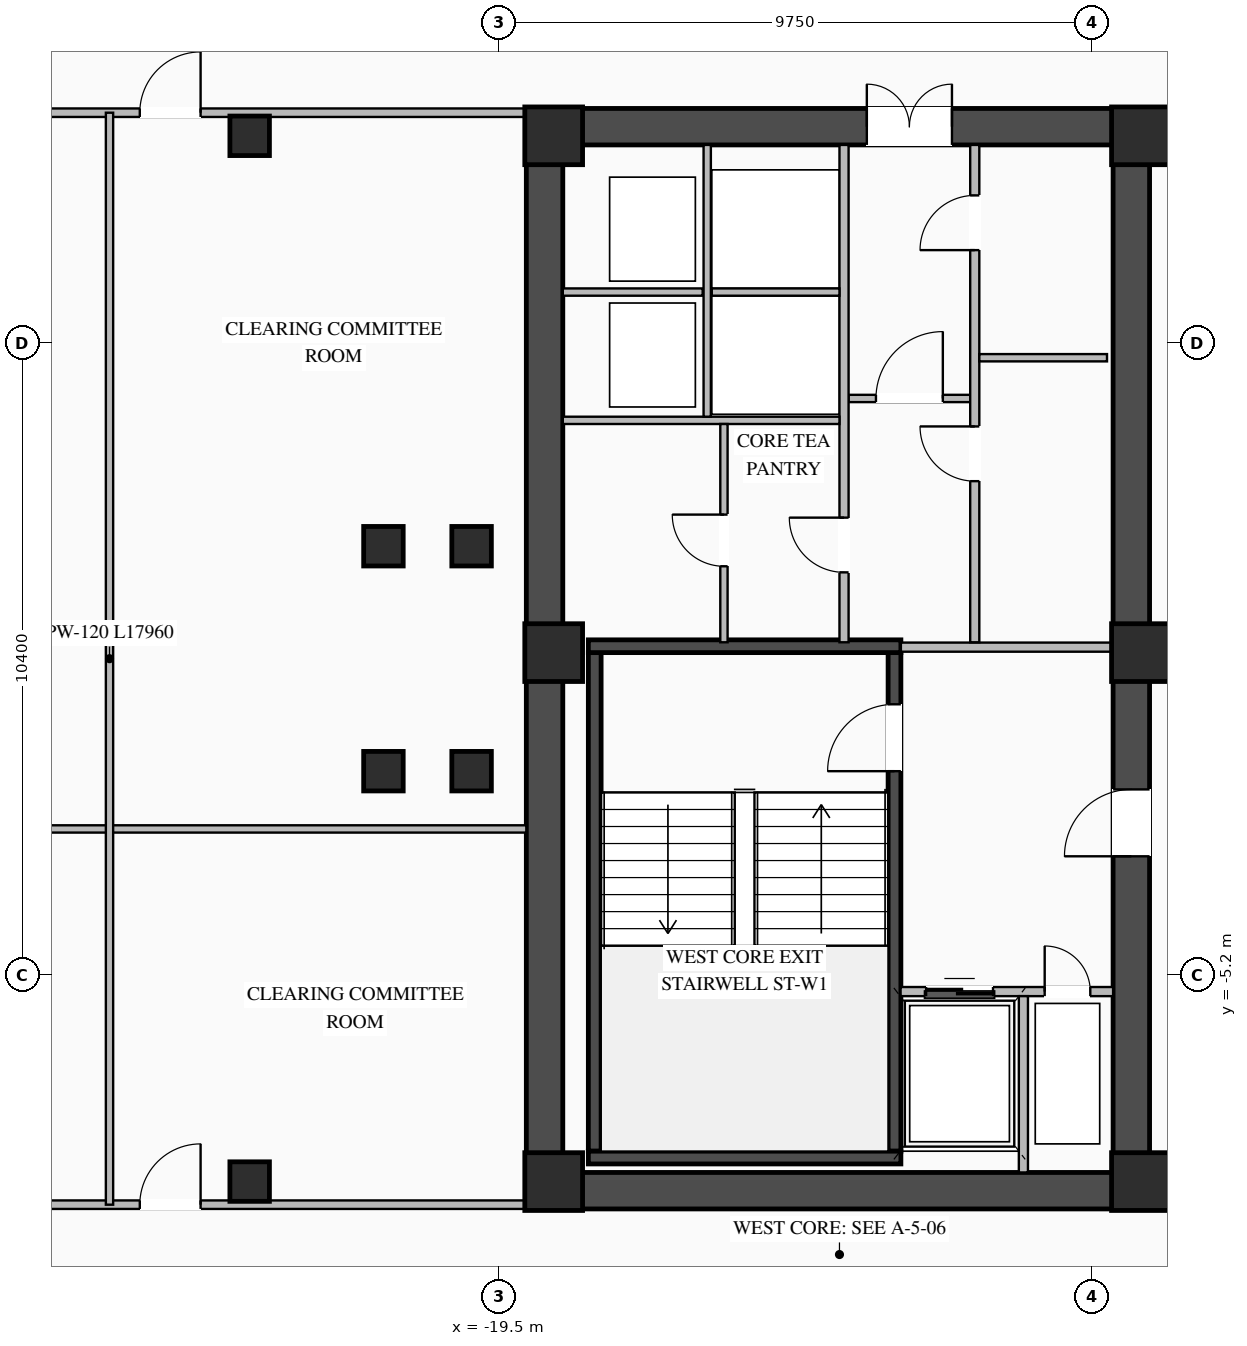
"""IFC4 building model, lengths in metres.
Left out: names, types, materials, properties, quantities, classifications, styles, units other than length and angle.
Written with IfcOpenShell. Run it as: python <this file> out.ifc"""

import sys

from ifc_helpers import new_model, si_unit, direction, frame, frame_2d, origin, origin_2d, place, context, subcontext, project, spatial, rectangle, i_section, extrude, element, fill, save


model = new_model("IFC4")
c1 = context("Model", 3, precision=1e-05, world=origin(), true_north=direction((0.0, 1.0)))
c2 = subcontext(c1, "Body", "Model", "MODEL_VIEW")
j1 = project(units=[si_unit("LENGTHUNIT", "METRE"), si_unit("PLANEANGLEUNIT", "RADIAN")], contexts=[c1])
p1 = place(None, origin())
s1 = spatial("IfcSite", under=j1, at=p1, CompositionType="ELEMENT")
p2 = place(p1, origin())
s2 = spatial("IfcBuilding", under=s1, at=p2, CompositionType="ELEMENT")
p3 = place(p2, frame((0.0, 0.0, 131.2)))
s3 = spatial("IfcBuildingStorey", under=s2, at=p3, CompositionType="ELEMENT", Elevation=131.2)
p4 = place(p3, frame((-19.05, -8.75, 0.0), z_axis=(0.0, 0.0, 1.0), x_axis=(1.0, 0.0, 0.0)))
e1 = element("IfcWall", 1, at=p4, inside=s3, PredefinedType="SHEAR", context=c2, shape_type="SweptSolid", body=[
    extrude(rectangle(XDim=10.25, YDim=0.6, at=frame_2d((5.125, 0.0))), origin(), (0.0, 0.0, 1.0), 3.27),
])
p5 = place(p3, frame((-19.05, 8.75, 0.0), z_axis=(0.0, 0.0, 1.0), x_axis=(1.0, 0.0, 0.0)))
e2 = element("IfcWall", 2, at=p5, inside=s3, PredefinedType="SHEAR", context=c2, shape_type="SweptSolid", body=[
    extrude(rectangle(XDim=10.25, YDim=0.6, at=frame_2d((5.125, 0.0))), origin(), (0.0, 0.0, 1.0), 3.27),
])
p6 = place(p5, frame((5.6, 0.0, 0.0)))
e3 = element("IfcOpeningElement", 3, at=p6, cuts=e2, PredefinedType="OPENING", context=c2, shape_type="SweptSolid", body=[
    extrude(rectangle(XDim=1.4, YDim=2.05, at=frame_2d((0.7, 1.025))), frame((0.0, 0.31, 0.0), z_axis=(0.0, -1.0, 0.0), x_axis=(1.0, 0.0, 0.0)), (0.0, 0.0, 1.0), 0.62),
])
p7 = place(p3, frame((-18.75, -8.45, 0.0), z_axis=(0.0, 0.0, 1.0), x_axis=(0.0, 1.0, 0.0)))
e4 = element("IfcWall", 4, at=p7, inside=s3, PredefinedType="SHEAR", context=c2, shape_type="SweptSolid", body=[
    extrude(rectangle(XDim=16.9, YDim=0.6, at=frame_2d((8.45, 0.0))), origin(), (0.0, 0.0, 1.0), 3.27),
])
p8 = place(p3, frame((-9.1, -8.45, 0.0), z_axis=(0.0, 0.0, 1.0), x_axis=(0.0, 1.0, 0.0)))
e5 = element("IfcWall", 5, at=p8, inside=s3, PredefinedType="SHEAR", context=c2, shape_type="SweptSolid", body=[
    extrude(rectangle(XDim=16.9, YDim=0.6, at=frame_2d((8.45, 0.0))), origin(), (0.0, 0.0, 1.0), 3.27),
])
p9 = place(p8, frame((5.2, 0.0, 0.0)))
e6 = element("IfcOpeningElement", 6, at=p9, cuts=e5, PredefinedType="OPENING", context=c2, shape_type="SweptSolid", body=[
    extrude(rectangle(XDim=1.1, YDim=2.08, at=frame_2d((0.55, 1.04))), frame((0.0, 0.31, 0.0), z_axis=(0.0, -1.0, 0.0), x_axis=(1.0, 0.0, 0.0)), (0.0, 0.0, 1.0), 0.62),
])
p10 = place(p3, frame((-12.995, -8.1, 0.0), z_axis=(0.0, 0.0, 1.0), x_axis=(0.0, 1.0, 0.0)))
e7 = element("IfcWall", 7, at=p10, inside=s3, PredefinedType="SHEAR", context=c2, shape_type="SweptSolid", body=[
    extrude(rectangle(XDim=8.2, YDim=0.21, at=frame_2d((4.1, 0.0))), origin(), (0.0, 0.0, 1.0), 3.27),
])
p11 = place(p10, frame((6.25, 0.0, 0.0)))
e8 = element("IfcOpeningElement", 8, at=p11, cuts=e7, PredefinedType="OPENING", context=c2, shape_type="SweptSolid", body=[
    extrude(rectangle(XDim=1.1, YDim=2.15, at=frame_2d((0.55, 1.075))), frame((0.0, 0.115, 0.0), z_axis=(0.0, -1.0, 0.0), x_axis=(1.0, 0.0, 0.0)), (0.0, 0.0, 1.0), 0.23),
])
p12 = place(p3, frame((-17.925, -8.1, 0.0), z_axis=(0.0, 0.0, 1.0), x_axis=(0.0, 1.0, 0.0)))
e9 = element("IfcWall", 9, at=p12, inside=s3, PredefinedType="SHEAR", context=c2, shape_type="SweptSolid", body=[
    extrude(rectangle(XDim=8.2, YDim=0.21, at=frame_2d((4.1, 0.0))), origin(), (0.0, 0.0, 1.0), 3.27),
])
for number, where, z_axis, x_axis in (
    (10, (-18.03, -8.205, 0.0), (0.0, 0.0, 1.0), (1.0, 0.0, 0.0)),
    (11, (-12.89, 0.205, 0.0), (0.0, 0.0, 1.0), (-1.0, 0.0, 0.0)),
):
    element("IfcWall", number, at=place(p3, frame(where, z_axis=z_axis, x_axis=x_axis)), inside=s3, PredefinedType="SHEAR", context=c2, shape_type="SweptSolid", body=[
        extrude(rectangle(XDim=5.14, YDim=0.21, at=frame_2d((2.57, 0.0))), origin(), (0.0, 0.0, 1.0), 3.27),
    ])
for number, where, z_axis, x_axis in (
    (12, (-8.95, -8.6, 0.0), (0.0, 0.0, 1.0), (1.0, 0.0, 0.0)),
    (13, (-8.95, 0.1, 0.0), (0.0, 0.0, 1.0), (1.0, 0.0, 0.0)),
    (14, (-8.95, 8.6, 0.0), (0.0, 0.0, 1.0), (1.0, 0.0, 0.0)),
    (15, (-18.6, -8.6, 0.0), (0.0, 0.0, 1.0), (1.0, 0.0, 0.0)),
    (16, (-18.6, 0.1, 0.0), (0.0, 0.0, 1.0), (1.0, 0.0, 0.0)),
    (17, (-18.6, 8.6, 0.0), (0.0, 0.0, 1.0), (1.0, 0.0, 0.0)),
):
    element("IfcColumn", number, at=place(p3, frame(where, z_axis=z_axis, x_axis=x_axis)), inside=s3, PredefinedType="COLUMN", context=c2, shape_type="SweptSolid", body=[
        extrude(rectangle(XDim=0.95, YDim=0.95, at=origin_2d()), origin(), (0.0, 0.0, 1.0), 3.45),
    ])
for number, where, z_axis, x_axis in (
    (18, (-21.4, -1.85, 0.0), (0.0, 0.0, 1.0), (1.0, 0.0, 0.0)),
    (19, (-21.4, 1.85, 0.0), (0.0, 0.0, 1.0), (1.0, 0.0, 0.0)),
    (20, (-19.95, -1.85, 0.0), (0.0, 0.0, 1.0), (1.0, 0.0, 0.0)),
    (21, (-19.95, 1.85, 0.0), (0.0, 0.0, 1.0), (1.0, 0.0, 0.0)),
    (22, (-23.6, -8.6, 0.0), (0.0, 0.0, 1.0), (1.0, 0.0, 0.0)),
    (23, (-23.6, 8.6, 0.0), (0.0, 0.0, 1.0), (1.0, 0.0, 0.0)),
):
    element("IfcColumn", number, at=place(p3, frame(where, z_axis=z_axis, x_axis=x_axis)), inside=s3, PredefinedType="COLUMN", context=c2, shape_type="SweptSolid", body=[
        extrude(i_section(OverallWidth=0.65, OverallDepth=0.65, WebThickness=0.028, FlangeThickness=0.04, at=origin_2d()), origin(), (0.0, 0.0, 1.0), 3.45),
    ])
p13 = place(p3, frame((-12.895, -5.475, 0.0), z_axis=(0.0, 0.0, 1.0), x_axis=(1.0, 0.0, 0.0)))
e24 = element("IfcWall", 24, at=p13, inside=s3, PredefinedType="STANDARD", context=c2, shape_type="SweptSolid", body=[
    extrude(rectangle(XDim=3.495, YDim=0.15, at=frame_2d((1.748, 0.0))), origin(), (0.0, 0.0, 1.0), 3.25),
])
p14 = place(p13, frame((0.42, 0.0, 0.0)))
e25 = element("IfcOpeningElement", 25, at=p14, cuts=e24, PredefinedType="OPENING", context=c2, shape_type="SweptSolid", body=[
    extrude(rectangle(XDim=1.1, YDim=2.15, at=frame_2d((0.55, 1.075))), frame((0.0, 0.085, 0.0), z_axis=(0.0, -1.0, 0.0), x_axis=(1.0, 0.0, 0.0)), (0.0, 0.0, 1.0), 0.17),
])
p15 = place(p13, frame((2.37, 0.0, 0.0)))
e26 = element("IfcOpeningElement", 26, at=p15, cuts=e24, PredefinedType="OPENING", context=c2, shape_type="SweptSolid", body=[
    extrude(rectangle(XDim=0.75, YDim=2.05, at=frame_2d((0.375, 1.025))), frame((0.0, 0.085, 0.0), z_axis=(0.0, -1.0, 0.0), x_axis=(1.0, 0.0, 0.0)), (0.0, 0.0, 1.0), 0.17),
])
p16 = place(p3, frame((-10.875, -8.45, 0.0), z_axis=(0.0, 0.0, 1.0), x_axis=(0.0, 1.0, 0.0)))
e27 = element("IfcWall", 27, at=p16, inside=s3, PredefinedType="STANDARD", context=c2, shape_type="SweptSolid", body=[
    extrude(rectangle(XDim=2.9, YDim=0.15, at=frame_2d((1.45, 0.0))), origin(), (0.0, 0.0, 1.0), 3.25),
])
p17 = place(p3, frame((-12.89, 0.19, 0.0), z_axis=(0.0, 0.0, 1.0), x_axis=(1.0, 0.0, 0.0)))
e28 = element("IfcWall", 28, at=p17, inside=s3, PredefinedType="STANDARD", context=c2, shape_type="SweptSolid", body=[
    extrude(rectangle(XDim=3.49, YDim=0.15, at=frame_2d((1.745, 0.0))), origin(), (0.0, 0.0, 1.0), 2.645),
])
p18 = place(p3, frame((-13.75, 4.28, 0.0), z_axis=(0.0, 0.0, 1.0), x_axis=(1.0, 0.0, 0.0)))
e29 = element("IfcWall", 29, at=p18, inside=s3, PredefinedType="STANDARD", context=c2, shape_type="SweptSolid", body=[
    extrude(rectangle(XDim=2.0, YDim=0.12, at=frame_2d((1.0, 0.0))), origin(), (0.0, 0.0, 1.0), 3.25),
])
p19 = place(p18, frame((0.45, 0.0, 0.0)))
e30 = element("IfcOpeningElement", 30, at=p19, cuts=e29, PredefinedType="OPENING", context=c2, shape_type="SweptSolid", body=[
    extrude(rectangle(XDim=1.1, YDim=2.1, at=frame_2d((0.55, 1.05))), frame((0.0, 0.07, 0.0), z_axis=(0.0, -1.0, 0.0), x_axis=(1.0, 0.0, 0.0)), (0.0, 0.0, 1.0), 0.14),
])
p20 = place(p3, frame((-11.675, 0.27, 0.0), z_axis=(0.0, 0.0, 1.0), x_axis=(0.0, 1.0, 0.0)))
e31 = element("IfcWall", 31, at=p20, inside=s3, PredefinedType="STANDARD", context=c2, shape_type="SweptSolid", body=[
    extrude(rectangle(XDim=8.18, YDim=0.15, at=frame_2d((4.09, 0.0))), origin(), (0.0, 0.0, 1.0), 3.25),
])
p21 = place(p20, frame((2.65, 0.0, 0.0)))
e32 = element("IfcOpeningElement", 32, at=p21, cuts=e31, PredefinedType="OPENING", context=c2, shape_type="SweptSolid", body=[
    extrude(rectangle(XDim=0.9, YDim=2.05, at=frame_2d((0.45, 1.025))), frame((0.0, 0.085, 0.0), z_axis=(0.0, -1.0, 0.0), x_axis=(1.0, 0.0, 0.0)), (0.0, 0.0, 1.0), 0.17),
])
p22 = place(p20, frame((6.45, 0.0, 0.0)))
e33 = element("IfcOpeningElement", 33, at=p22, cuts=e31, PredefinedType="OPENING", context=c2, shape_type="SweptSolid", body=[
    extrude(rectangle(XDim=0.9, YDim=2.05, at=frame_2d((0.45, 1.025))), frame((0.0, 0.085, 0.0), z_axis=(0.0, -1.0, 0.0), x_axis=(1.0, 0.0, 0.0)), (0.0, 0.0, 1.0), 0.17),
])
p23 = place(p3, frame((-11.6, 4.95, 0.0), z_axis=(0.0, 0.0, 1.0), x_axis=(1.0, 0.0, 0.0)))
e34 = element("IfcWall", 34, at=p23, inside=s3, PredefinedType="STANDARD", context=c2, shape_type="SweptSolid", body=[
    extrude(rectangle(XDim=2.1, YDim=0.12, at=frame_2d((1.05, 0.0))), origin(), (0.0, 0.0, 1.0), 3.25),
])
p24 = place(p3, frame((-13.825, 0.27, 0.0), z_axis=(0.0, 0.0, 1.0), x_axis=(0.0, 1.0, 0.0)))
e35 = element("IfcWall", 35, at=p24, inside=s3, PredefinedType="STANDARD", context=c2, shape_type="SweptSolid", body=[
    extrude(rectangle(XDim=8.18, YDim=0.15, at=frame_2d((4.09, 0.0))), origin(), (0.0, 0.0, 1.0), 3.25),
])
p25 = place(p24, frame((1.15, 0.0, 0.0)))
e36 = element("IfcOpeningElement", 36, at=p25, cuts=e35, PredefinedType="OPENING", context=c2, shape_type="SweptSolid", body=[
    extrude(rectangle(XDim=0.9, YDim=2.05, at=frame_2d((0.45, 1.025))), frame((0.0, 0.085, 0.0), z_axis=(0.0, -1.0, 0.0), x_axis=(1.0, 0.0, 0.0)), (0.0, 0.0, 1.0), 0.17),
])
p26 = place(p3, frame((-18.45, 3.92, 0.0), z_axis=(0.0, 0.0, 1.0), x_axis=(1.0, 0.0, 0.0)))
e37 = element("IfcWall", 37, at=p26, inside=s3, PredefinedType="STANDARD", context=c2, shape_type="SweptSolid", body=[
    extrude(rectangle(XDim=4.55, YDim=0.12, at=frame_2d((2.275, 0.0))), origin(), (0.0, 0.0, 1.0), 3.25),
])
p27 = place(p3, frame((-18.45, 6.03, 0.0), z_axis=(0.0, 0.0, 1.0), x_axis=(1.0, 0.0, 0.0)))
e38 = element("IfcWall", 38, at=p27, inside=s3, PredefinedType="STANDARD", context=c2, shape_type="SweptSolid", body=[
    extrude(rectangle(XDim=2.3, YDim=0.12, at=frame_2d((1.15, 0.0))), origin(), (0.0, 0.0, 1.0), 3.25),
])
p28 = place(p3, frame((-16.075, 3.98, 0.0), z_axis=(0.0, 0.0, 1.0), x_axis=(0.0, 1.0, 0.0)))
e39 = element("IfcWall", 39, at=p28, inside=s3, PredefinedType="STANDARD", context=c2, shape_type="SweptSolid", body=[
    extrude(rectangle(XDim=4.47, YDim=0.12, at=frame_2d((2.235, 0.0))), origin(), (0.0, 0.0, 1.0), 3.25),
])
p29 = place(p3, frame((-16.0, 6.03, 0.0), z_axis=(0.0, 0.0, 1.0), x_axis=(1.0, 0.0, 0.0)))
e40 = element("IfcWall", 40, at=p29, inside=s3, PredefinedType="STANDARD", context=c2, shape_type="SweptSolid", body=[
    extrude(rectangle(XDim=2.1, YDim=0.12, at=frame_2d((1.05, 0.0))), origin(), (0.0, 0.0, 1.0), 3.25),
])
p30 = place(p3, frame((-15.8, 0.27, 0.0), z_axis=(0.0, 0.0, 1.0), x_axis=(0.0, 1.0, 0.0)))
e41 = element("IfcWall", 41, at=p30, inside=s3, PredefinedType="STANDARD", context=c2, shape_type="SweptSolid", body=[
    extrude(rectangle(XDim=3.59, YDim=0.12, at=frame_2d((1.795, 0.0))), origin(), (0.0, 0.0, 1.0), 3.25),
])
p31 = place(p30, frame((1.25, 0.0, 0.0)))
e42 = element("IfcOpeningElement", 42, at=p31, cuts=e41, PredefinedType="OPENING", context=c2, shape_type="SweptSolid", body=[
    extrude(rectangle(XDim=0.85, YDim=2.05, at=frame_2d((0.425, 1.025))), frame((0.0, 0.07, 0.0), z_axis=(0.0, -1.0, 0.0), x_axis=(1.0, 0.0, 0.0)), (0.0, 0.0, 1.0), 0.14),
])
p32 = place(p3, frame((-32.82, 8.98, 0.0), z_axis=(0.0, 0.0, 1.0), x_axis=(1.0, 0.0, 0.0)))
e43 = element("IfcWall", 43, at=p32, inside=s3, PredefinedType="STANDARD", context=c2, shape_type="SweptSolid", body=[
    extrude(rectangle(XDim=13.77, YDim=0.14, at=frame_2d((6.885, 0.0))), origin(), (0.0, 0.0, 1.0), 3.25),
])
p33 = place(p32, frame((1.171, 0.0, 0.0)))
e44 = element("IfcOpeningElement", 44, at=p33, cuts=e43, PredefinedType="OPENING", context=c2, shape_type="SweptSolid", body=[
    extrude(rectangle(XDim=1.0, YDim=2.08, at=frame_2d((0.5, 1.04))), frame((0.0, 0.08, 0.0), z_axis=(0.0, -1.0, 0.0), x_axis=(1.0, 0.0, 0.0)), (0.0, 0.0, 1.0), 0.16),
])
p34 = place(p32, frame((7.413, 0.0, 0.0)))
e45 = element("IfcOpeningElement", 45, at=p34, cuts=e43, PredefinedType="OPENING", context=c2, shape_type="SweptSolid", body=[
    extrude(rectangle(XDim=1.0, YDim=2.08, at=frame_2d((0.5, 1.04))), frame((0.0, 0.08, 0.0), z_axis=(0.0, -1.0, 0.0), x_axis=(1.0, 0.0, 0.0)), (0.0, 0.0, 1.0), 0.16),
])
p35 = place(p3, frame((-32.82, -8.98, 0.0), z_axis=(0.0, 0.0, 1.0), x_axis=(1.0, 0.0, 0.0)))
e46 = element("IfcWall", 46, at=p35, inside=s3, PredefinedType="STANDARD", context=c2, shape_type="SweptSolid", body=[
    extrude(rectangle(XDim=13.77, YDim=0.14, at=frame_2d((6.885, 0.0))), origin(), (0.0, 0.0, 1.0), 3.25),
])
p36 = place(p35, frame((1.171, 0.0, 0.0)))
e47 = element("IfcOpeningElement", 47, at=p36, cuts=e46, PredefinedType="OPENING", context=c2, shape_type="SweptSolid", body=[
    extrude(rectangle(XDim=1.0, YDim=2.08, at=frame_2d((0.5, 1.04))), frame((0.0, 0.08, 0.0), z_axis=(0.0, -1.0, 0.0), x_axis=(1.0, 0.0, 0.0)), (0.0, 0.0, 1.0), 0.16),
])
p37 = place(p35, frame((7.413, 0.0, 0.0)))
e48 = element("IfcOpeningElement", 48, at=p37, cuts=e46, PredefinedType="OPENING", context=c2, shape_type="SweptSolid", body=[
    extrude(rectangle(XDim=1.0, YDim=2.08, at=frame_2d((0.5, 1.04))), frame((0.0, 0.08, 0.0), z_axis=(0.0, -1.0, 0.0), x_axis=(1.0, 0.0, 0.0)), (0.0, 0.0, 1.0), 0.16),
])
p38 = place(p3, frame((-32.82, -2.8, 0.0), z_axis=(0.0, 0.0, 1.0), x_axis=(1.0, 0.0, 0.0)))
e49 = element("IfcWall", 49, at=p38, inside=s3, PredefinedType="STANDARD", context=c2, shape_type="SweptSolid", body=[
    extrude(rectangle(XDim=13.77, YDim=0.12, at=frame_2d((6.885, 0.0))), origin(), (0.0, 0.0, 1.0), 3.25),
])
p39 = place(p3, frame((-25.905, -8.98, 0.0), z_axis=(0.0, 0.0, 1.0), x_axis=(0.0, 1.0, 0.0)))
e50 = element("IfcWall", 50, at=p39, inside=s3, PredefinedType="STANDARD", context=c2, shape_type="SweptSolid", body=[
    extrude(rectangle(XDim=17.96, YDim=0.12, at=frame_2d((8.98, 0.0))), origin(), (0.0, 0.0, 1.0), 3.25),
])
p40 = place(p11, origin())
e51 = element("IfcDoor", 51, at=p40, inside=s3, OperationType="SINGLE_SWING_LEFT", PredefinedType="DOOR", context=c2, shape_type="SweptSolid", body=[
    extrude(rectangle(XDim=1.1, YDim=2.15, at=frame_2d((0.55, 1.075))), frame((0.0, 0.025, 0.0), z_axis=(0.0, -1.0, 0.0), x_axis=(1.0, 0.0, 0.0)), (0.0, 0.0, 1.0), 0.05),
])
fill(e8, e51)
p41 = place(p14, origin())
e52 = element("IfcDoor", 52, at=p41, inside=s3, OperationType="DOUBLE_DOOR_SLIDING", PredefinedType="DOOR", context=c2, shape_type="SweptSolid", body=[
    extrude(rectangle(XDim=1.1, YDim=2.15, at=frame_2d((0.55, 1.075))), frame((0.0, 0.025, 0.0), z_axis=(0.0, -1.0, 0.0), x_axis=(1.0, 0.0, 0.0)), (0.0, 0.0, 1.0), 0.05),
])
fill(e25, e52)
p42 = place(p15, origin())
e53 = element("IfcDoor", 53, at=p42, inside=s3, OperationType="SINGLE_SWING_LEFT", PredefinedType="DOOR", context=c2, shape_type="SweptSolid", body=[
    extrude(rectangle(XDim=0.75, YDim=2.05, at=frame_2d((0.375, 1.025))), frame((0.0, 0.025, 0.0), z_axis=(0.0, -1.0, 0.0), x_axis=(1.0, 0.0, 0.0)), (0.0, 0.0, 1.0), 0.05),
])
fill(e26, e53)
p43 = place(p9, origin())
e54 = element("IfcDoor", 54, at=p43, inside=s3, OperationType="SINGLE_SWING_LEFT", PredefinedType="DOOR", context=c2, shape_type="SweptSolid", body=[
    extrude(rectangle(XDim=1.1, YDim=2.08, at=frame_2d((0.55, 1.04))), frame((0.0, 0.255, 0.0), z_axis=(0.0, -1.0, 0.0), x_axis=(1.0, 0.0, 0.0)), (0.0, 0.0, 1.0), 0.05),
])
fill(e6, e54)
p44 = place(p19, origin())
e55 = element("IfcDoor", 55, at=p44, inside=s3, OperationType="SINGLE_SWING_RIGHT", PredefinedType="DOOR", context=c2, shape_type="SweptSolid", body=[
    extrude(rectangle(XDim=1.1, YDim=2.1, at=frame_2d((0.55, 1.05))), frame((0.0, 0.025, 0.0), z_axis=(0.0, -1.0, 0.0), x_axis=(1.0, 0.0, 0.0)), (0.0, 0.0, 1.0), 0.05),
])
fill(e30, e55)
p45 = place(p6, origin())
e56 = element("IfcDoor", 56, at=p45, inside=s3, OperationType="DOUBLE_DOOR_SINGLE_SWING", PredefinedType="DOOR", context=c2, shape_type="SweptSolid", body=[
    extrude(rectangle(XDim=1.4, YDim=2.05, at=frame_2d((0.7, 1.025))), frame((0.0, 0.245, 0.0), z_axis=(0.0, -1.0, 0.0), x_axis=(1.0, 0.0, 0.0)), (0.0, 0.0, 1.0), 0.05),
])
fill(e3, e56)
p46 = place(p21, origin())
e57 = element("IfcDoor", 57, at=p46, inside=s3, OperationType="SINGLE_SWING_RIGHT", PredefinedType="DOOR", context=c2, shape_type="SweptSolid", body=[
    extrude(rectangle(XDim=0.9, YDim=2.05, at=frame_2d((0.45, 1.025))), frame((0.0, 0.025, 0.0), z_axis=(0.0, -1.0, 0.0), x_axis=(1.0, 0.0, 0.0)), (0.0, 0.0, 1.0), 0.05),
])
fill(e32, e57)
p47 = place(p22, origin())
e58 = element("IfcDoor", 58, at=p47, inside=s3, OperationType="SINGLE_SWING_LEFT", PredefinedType="DOOR", context=c2, shape_type="SweptSolid", body=[
    extrude(rectangle(XDim=0.9, YDim=2.05, at=frame_2d((0.45, 1.025))), frame((0.0, 0.025, 0.0), z_axis=(0.0, -1.0, 0.0), x_axis=(1.0, 0.0, 0.0)), (0.0, 0.0, 1.0), 0.05),
])
fill(e33, e58)
p48 = place(p25, origin())
e59 = element("IfcDoor", 59, at=p48, inside=s3, OperationType="SINGLE_SWING_RIGHT", PredefinedType="DOOR", context=c2, shape_type="SweptSolid", body=[
    extrude(rectangle(XDim=0.9, YDim=2.05, at=frame_2d((0.45, 1.025))), frame((0.0, 0.025, 0.0), z_axis=(0.0, -1.0, 0.0), x_axis=(1.0, 0.0, 0.0)), (0.0, 0.0, 1.0), 0.05),
])
fill(e36, e59)
p49 = place(p31, origin())
e60 = element("IfcDoor", 60, at=p49, inside=s3, OperationType="SINGLE_SWING_RIGHT", PredefinedType="DOOR", context=c2, shape_type="SweptSolid", body=[
    extrude(rectangle(XDim=0.85, YDim=2.05, at=frame_2d((0.425, 1.025))), frame((0.0, 0.025, 0.0), z_axis=(0.0, -1.0, 0.0), x_axis=(1.0, 0.0, 0.0)), (0.0, 0.0, 1.0), 0.05),
])
fill(e42, e60)
p50 = place(p34, origin())
e61 = element("IfcDoor", 61, at=p50, inside=s3, OperationType="SINGLE_SWING_RIGHT", PredefinedType="DOOR", context=c2, shape_type="SweptSolid", body=[
    extrude(rectangle(XDim=1.0, YDim=2.08, at=frame_2d((0.5, 1.04))), frame((0.0, 0.025, 0.0), z_axis=(0.0, -1.0, 0.0), x_axis=(1.0, 0.0, 0.0)), (0.0, 0.0, 1.0), 0.05),
])
fill(e45, e61)
p51 = place(p37, origin())
e62 = element("IfcDoor", 62, at=p51, inside=s3, OperationType="SINGLE_SWING_RIGHT", PredefinedType="DOOR", context=c2, shape_type="SweptSolid", body=[
    extrude(rectangle(XDim=1.0, YDim=2.08, at=frame_2d((0.5, 1.04))), frame((0.0, 0.025, 0.0), z_axis=(0.0, -1.0, 0.0), x_axis=(1.0, 0.0, 0.0)), (0.0, 0.0, 1.0), 0.05),
])
fill(e48, e62)
save(model, sys.argv[1])
